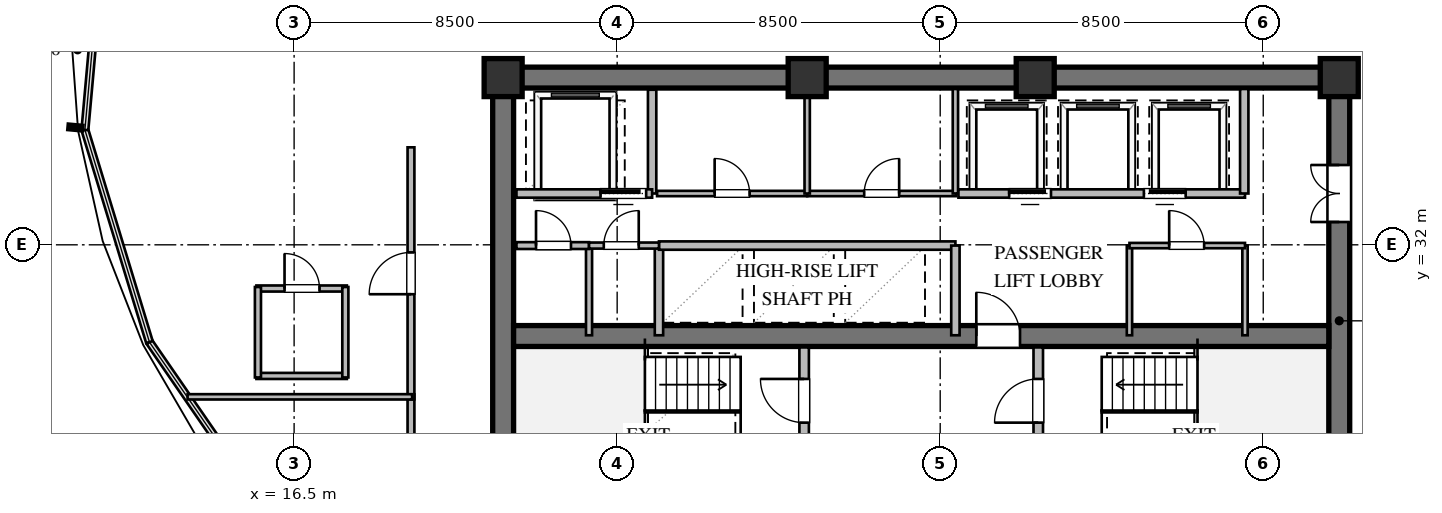
"""IFC4 building model, lengths in metres.
Left out: names, types, materials, properties, quantities, classifications, styles, units other than length and angle.
Written with IfcOpenShell. Run it as: python <this file> out.ifc"""

import sys

from ifc_helpers import new_model, si_unit, direction, frame, frame_2d, origin, origin_2d, place, context, subcontext, project, spatial, rectangle, extrude, element, fill, save


model = new_model("IFC4")
c1 = context("Model", 3, precision=1e-05, world=origin(), true_north=direction((0.0, 1.0)))
c2 = subcontext(c1, "Body", "Model", "MODEL_VIEW")
j1 = project(units=[si_unit("LENGTHUNIT", "METRE"), si_unit("PLANEANGLEUNIT", "RADIAN")], contexts=[c1])
p1 = place(None, origin())
s1 = spatial("IfcSite", under=j1, at=p1, CompositionType="ELEMENT")
p2 = place(p1, origin())
s2 = spatial("IfcBuilding", under=s1, at=p2, CompositionType="ELEMENT")
p3 = place(p2, frame((0.0, 0.0, 145.8)))
s3 = spatial("IfcBuildingStorey", under=s2, at=p3, CompositionType="ELEMENT", Elevation=145.8)
p4 = place(p3, frame((21.725, 36.4, 0.0), z_axis=(0.0, 0.0, 1.0), x_axis=(1.0, 0.0, 0.0)))
e1 = element("IfcWall", 1, at=p4, inside=s3, PredefinedType="SHEAR", context=c2, shape_type="SweptSolid", body=[
    extrude(rectangle(XDim=22.55, YDim=0.55, at=frame_2d((11.275, 0.0))), origin(), (0.0, 0.0, 1.0), 3.36),
])
p5 = place(p3, frame((22.0, 23.875, 0.0), z_axis=(0.0, 0.0, 1.0), x_axis=(0.0, 1.0, 0.0)))
e2 = element("IfcWall", 2, at=p5, inside=s3, PredefinedType="SHEAR", context=c2, shape_type="SweptSolid", body=[
    extrude(rectangle(XDim=12.25, YDim=0.55, at=frame_2d((6.125, 0.0))), origin(), (0.0, 0.0, 1.0), 3.36),
])
p6 = place(p3, frame((44.0, 23.875, 0.0), z_axis=(0.0, 0.0, 1.0), x_axis=(0.0, 1.0, 0.0)))
e3 = element("IfcWall", 3, at=p6, inside=s3, PredefinedType="SHEAR", context=c2, shape_type="SweptSolid", body=[
    extrude(rectangle(XDim=12.25, YDim=0.55, at=frame_2d((6.125, 0.0))), origin(), (0.0, 0.0, 1.0), 3.36),
])
p7 = place(p6, frame((8.725, 0.0, 0.0)))
e4 = element("IfcOpeningElement", 4, at=p7, cuts=e3, PredefinedType="OPENING", context=c2, shape_type="SweptSolid", body=[
    extrude(rectangle(XDim=1.5, YDim=2.15, at=frame_2d((0.75, 1.075))), frame((0.0, 0.285, 0.0), z_axis=(0.0, -1.0, 0.0), x_axis=(1.0, 0.0, 0.0)), (0.0, 0.0, 1.0), 0.57),
])
p8 = place(p3, frame((22.275, 29.6, 0.0), z_axis=(0.0, 0.0, 1.0), x_axis=(1.0, 0.0, 0.0)))
e5 = element("IfcWall", 5, at=p8, inside=s3, PredefinedType="SHEAR", context=c2, shape_type="SweptSolid", body=[
    extrude(rectangle(XDim=21.45, YDim=0.55, at=frame_2d((10.725, 0.0))), origin(), (0.0, 0.0, 1.0), 3.36),
])
p9 = place(p8, frame((12.175, 0.0, 0.0)))
e6 = element("IfcOpeningElement", 6, at=p9, cuts=e5, PredefinedType="OPENING", context=c2, shape_type="SweptSolid", body=[
    extrude(rectangle(XDim=1.15, YDim=2.1, at=frame_2d((0.575, 1.05))), frame((0.0, 0.285, 0.0), z_axis=(0.0, -1.0, 0.0), x_axis=(1.0, 0.0, 0.0)), (0.0, 0.0, 1.0), 0.57),
])
for number, where, z_axis, x_axis in (
    (7, (44.0, 36.4, 0.0), (0.0, 0.0, 1.0), (1.0, 0.0, 0.0)),
    (8, (36.0, 36.4, 0.0), (0.0, 0.0, 1.0), (1.0, 0.0, 0.0)),
    (9, (30.0, 36.4, 0.0), (0.0, 0.0, 1.0), (1.0, 0.0, 0.0)),
    (10, (22.0, 36.4, 0.0), (0.0, 0.0, 1.0), (1.0, 0.0, 0.0)),
):
    element("IfcColumn", number, at=place(p3, frame(where, z_axis=z_axis, x_axis=x_axis)), inside=s3, PredefinedType="COLUMN", context=c2, shape_type="SweptSolid", body=[
        extrude(rectangle(XDim=1.0, YDim=1.0, at=origin_2d()), origin(), (0.0, 0.0, 1.0), 3.6),
    ])
p10 = place(p3, frame((29.92, 23.9, 0.0), z_axis=(0.0, 0.0, 1.0), x_axis=(0.0, 1.0, 0.0)))
e11 = element("IfcWall", 11, at=p10, inside=s3, PredefinedType="SOLIDWALL", context=c2, shape_type="SweptSolid", body=[
    extrude(rectangle(XDim=5.4, YDim=0.25, at=frame_2d((2.7, 0.0))), origin(), (0.0, 0.0, 1.0), 2.806),
])
p11 = place(p10, frame((3.421, 0.0, 0.0)))
e12 = element("IfcOpeningElement", 12, at=p11, cuts=e11, PredefinedType="OPENING", context=c2, shape_type="SweptSolid", body=[
    extrude(rectangle(XDim=1.15, YDim=2.1, at=frame_2d((0.575, 1.05))), frame((0.0, 0.135, 0.0), z_axis=(0.0, -1.0, 0.0), x_axis=(1.0, 0.0, 0.0)), (0.0, 0.0, 1.0), 0.27),
])
p12 = place(p3, frame((36.08, 23.9, 0.0), z_axis=(0.0, 0.0, 1.0), x_axis=(0.0, 1.0, 0.0)))
e13 = element("IfcWall", 13, at=p12, inside=s3, PredefinedType="SOLIDWALL", context=c2, shape_type="SweptSolid", body=[
    extrude(rectangle(XDim=5.4, YDim=0.25, at=frame_2d((2.7, 0.0))), origin(), (0.0, 0.0, 1.0), 3.36),
])
p13 = place(p12, frame((3.421, 0.0, 0.0)))
e14 = element("IfcOpeningElement", 14, at=p13, cuts=e13, PredefinedType="OPENING", context=c2, shape_type="SweptSolid", body=[
    extrude(rectangle(XDim=1.15, YDim=2.1, at=frame_2d((0.575, 1.05))), frame((0.0, 0.135, 0.0), z_axis=(0.0, -1.0, 0.0), x_axis=(1.0, 0.0, 0.0)), (0.0, 0.0, 1.0), 0.27),
])
p14 = place(p3, frame((25.92, 33.35, 0.0), z_axis=(0.0, 0.0, 1.0), x_axis=(0.0, 1.0, 0.0)))
e15 = element("IfcWall", 15, at=p14, inside=s3, PredefinedType="SOLIDWALL", context=c2, shape_type="SweptSolid", body=[
    extrude(rectangle(XDim=2.73, YDim=0.22, at=frame_2d((1.365, 0.0))), origin(), (0.0, 0.0, 1.0), 3.36),
])
p15 = place(p3, frame((22.35, 33.35, 0.0), z_axis=(0.0, 0.0, 1.0), x_axis=(1.0, 0.0, 0.0)))
e16 = element("IfcWall", 16, at=p15, inside=s3, PredefinedType="SOLIDWALL", context=c2, shape_type="SweptSolid", body=[
    extrude(rectangle(XDim=3.57, YDim=0.22, at=frame_2d((1.785, 0.0))), origin(), (0.0, 0.0, 1.0), 3.36),
])
p16 = place(p15, frame((2.213, 0.0, 0.0)))
e17 = element("IfcOpeningElement", 17, at=p16, cuts=e16, PredefinedType="OPENING", context=c2, shape_type="SweptSolid", body=[
    extrude(rectangle(XDim=1.2, YDim=2.1, at=frame_2d((0.6, 1.05))), frame((0.0, 0.12, 0.0), z_axis=(0.0, -1.0, 0.0), x_axis=(1.0, 0.0, 0.0)), (0.0, 0.0, 1.0), 0.24),
])
p17 = place(p3, frame((26.1, 29.62, 0.0), z_axis=(0.0, 0.0, 1.0), x_axis=(0.0, 1.0, 0.0)))
e18 = element("IfcWall", 18, at=p17, inside=s3, PredefinedType="SOLIDWALL", context=c2, shape_type="SweptSolid", body=[
    extrude(rectangle(XDim=2.36, YDim=0.22, at=frame_2d((1.18, 0.0))), origin(), (0.0, 0.0, 1.0), 3.36),
])
p18 = place(p3, frame((26.1, 31.98, 0.0), z_axis=(0.0, 0.0, 1.0), x_axis=(1.0, 0.0, 0.0)))
e19 = element("IfcWall", 19, at=p18, inside=s3, PredefinedType="SOLIDWALL", context=c2, shape_type="SweptSolid", body=[
    extrude(rectangle(XDim=7.8, YDim=0.22, at=frame_2d((3.9, 0.0))), origin(), (0.0, 0.0, 1.0), 3.36),
])
p19 = place(p3, frame((33.9, 29.62, 0.0), z_axis=(0.0, 0.0, 1.0), x_axis=(0.0, 1.0, 0.0)))
e20 = element("IfcWall", 20, at=p19, inside=s3, PredefinedType="SOLIDWALL", context=c2, shape_type="SweptSolid", body=[
    extrude(rectangle(XDim=2.36, YDim=0.22, at=frame_2d((1.18, 0.0))), origin(), (0.0, 0.0, 1.0), 3.36),
])
p20 = place(p3, frame((26.05, 33.35, 0.0), z_axis=(0.0, 0.0, 1.0), x_axis=(1.0, 0.0, 0.0)))
e21 = element("IfcWall", 21, at=p20, inside=s3, PredefinedType="PARTITIONING", context=c2, shape_type="SweptSolid", body=[
    extrude(rectangle(XDim=3.95, YDim=0.14, at=frame_2d((1.975, 0.0))), origin(), (0.0, 0.0, 1.0), 3.36),
])
p21 = place(p20, frame((1.515, 0.0, 0.0)))
e22 = element("IfcOpeningElement", 22, at=p21, cuts=e21, PredefinedType="OPENING", context=c2, shape_type="SweptSolid", body=[
    extrude(rectangle(XDim=0.92, YDim=2.1, at=frame_2d((0.46, 1.05))), frame((0.0, 0.08, 0.0), z_axis=(0.0, -1.0, 0.0), x_axis=(1.0, 0.0, 0.0)), (0.0, 0.0, 1.0), 0.16),
])
p22 = place(p3, frame((30.0, 33.35, 0.0), z_axis=(0.0, 0.0, 1.0), x_axis=(1.0, 0.0, 0.0)))
e23 = element("IfcWall", 23, at=p22, inside=s3, PredefinedType="PARTITIONING", context=c2, shape_type="SweptSolid", body=[
    extrude(rectangle(XDim=3.92, YDim=0.14, at=frame_2d((1.96, 0.0))), origin(), (0.0, 0.0, 1.0), 3.36),
])
p23 = place(p22, frame((1.5, 0.0, 0.0)))
e24 = element("IfcOpeningElement", 24, at=p23, cuts=e23, PredefinedType="OPENING", context=c2, shape_type="SweptSolid", body=[
    extrude(rectangle(XDim=0.92, YDim=2.1, at=frame_2d((0.46, 1.05))), frame((0.0, 0.08, 0.0), z_axis=(0.0, -1.0, 0.0), x_axis=(1.0, 0.0, 0.0)), (0.0, 0.0, 1.0), 0.16),
])
for number, where, z_axis, x_axis in (
    (25, (30.0, 33.35, 0.0), (0.0, 0.0, 1.0), (0.0, 1.0, 0.0)),
    (26, (33.9, 33.35, 0.0), (0.0, 0.0, 1.0), (0.0, 1.0, 0.0)),
):
    element("IfcWall", number, at=place(p3, frame(where, z_axis=z_axis, x_axis=x_axis)), inside=s3, PredefinedType="PARTITIONING", context=c2, shape_type="SweptSolid", body=[
        extrude(rectangle(XDim=2.75, YDim=0.14, at=frame_2d((1.375, 0.0))), origin(), (0.0, 0.0, 1.0), 3.36),
    ])
p24 = place(p3, frame((33.98, 33.35, 0.0), z_axis=(0.0, 0.0, 1.0), x_axis=(1.0, 0.0, 0.0)))
e27 = element("IfcWall", 27, at=p24, inside=s3, PredefinedType="SOLIDWALL", context=c2, shape_type="SweptSolid", body=[
    extrude(rectangle(XDim=7.54, YDim=0.22, at=frame_2d((3.77, 0.0))), origin(), (0.0, 0.0, 1.0), 3.36),
])
p25 = place(p24, frame((1.335, 0.0, 0.0)))
e28 = element("IfcOpeningElement", 28, at=p25, cuts=e27, PredefinedType="OPENING", context=c2, shape_type="SweptSolid", body=[
    extrude(rectangle(XDim=1.1, YDim=2.1, at=frame_2d((0.55, 1.05))), frame((0.0, 0.12, 0.0), z_axis=(0.0, -1.0, 0.0), x_axis=(1.0, 0.0, 0.0)), (0.0, 0.0, 1.0), 0.24),
])
p26 = place(p24, frame((4.879, 0.0, 0.0)))
e29 = element("IfcOpeningElement", 29, at=p26, cuts=e27, PredefinedType="OPENING", context=c2, shape_type="SweptSolid", body=[
    extrude(rectangle(XDim=1.1, YDim=2.1, at=frame_2d((0.55, 1.05))), frame((0.0, 0.12, 0.0), z_axis=(0.0, -1.0, 0.0), x_axis=(1.0, 0.0, 0.0)), (0.0, 0.0, 1.0), 0.24),
])
p27 = place(p3, frame((41.5, 33.35, 0.0), z_axis=(0.0, 0.0, 1.0), x_axis=(0.0, 1.0, 0.0)))
e30 = element("IfcWall", 30, at=p27, inside=s3, PredefinedType="SOLIDWALL", context=c2, shape_type="SweptSolid", body=[
    extrude(rectangle(XDim=2.75, YDim=0.22, at=frame_2d((1.375, 0.0))), origin(), (0.0, 0.0, 1.0), 3.36),
])
p28 = place(p3, frame((24.26, 29.62, 0.0), z_axis=(0.0, 0.0, 1.0), x_axis=(0.0, 1.0, 0.0)))
e31 = element("IfcWall", 31, at=p28, inside=s3, PredefinedType="PLUMBINGWALL", context=c2, shape_type="SweptSolid", body=[
    extrude(rectangle(XDim=2.36, YDim=0.16, at=frame_2d((1.18, 0.0))), origin(), (0.0, 0.0, 1.0), 3.36),
])
p29 = place(p3, frame((22.35, 31.98, 0.0), z_axis=(0.0, 0.0, 1.0), x_axis=(1.0, 0.0, 0.0)))
e32 = element("IfcWall", 32, at=p29, inside=s3, PredefinedType="PARTITIONING", context=c2, shape_type="SweptSolid", body=[
    extrude(rectangle(XDim=1.91, YDim=0.18, at=frame_2d((0.955, 0.0))), origin(), (0.0, 0.0, 1.0), 3.36),
])
p30 = place(p29, frame((0.515, 0.0, 0.0)))
e33 = element("IfcOpeningElement", 33, at=p30, cuts=e32, PredefinedType="OPENING", context=c2, shape_type="SweptSolid", body=[
    extrude(rectangle(XDim=0.92, YDim=2.1, at=frame_2d((0.46, 1.05))), frame((0.0, 0.1, 0.0), z_axis=(0.0, -1.0, 0.0), x_axis=(1.0, 0.0, 0.0)), (0.0, 0.0, 1.0), 0.2),
])
p31 = place(p3, frame((24.26, 31.98, 0.0), z_axis=(0.0, 0.0, 1.0), x_axis=(1.0, 0.0, 0.0)))
e34 = element("IfcWall", 34, at=p31, inside=s3, PredefinedType="PLUMBINGWALL", context=c2, shape_type="SweptSolid", body=[
    extrude(rectangle(XDim=1.84, YDim=0.16, at=frame_2d((0.92, 0.0))), origin(), (0.0, 0.0, 1.0), 3.36),
])
p32 = place(p31, frame((0.388, 0.0, 0.0)))
e35 = element("IfcOpeningElement", 35, at=p32, cuts=e34, PredefinedType="OPENING", context=c2, shape_type="SweptSolid", body=[
    extrude(rectangle(XDim=0.92, YDim=2.1, at=frame_2d((0.46, 1.05))), frame((0.0, 0.09, 0.0), z_axis=(0.0, -1.0, 0.0), x_axis=(1.0, 0.0, 0.0)), (0.0, 0.0, 1.0), 0.18),
])
for number, where, z_axis, x_axis in (
    (36, (38.48, 29.62, 0.0), (0.0, 0.0, 1.0), (0.0, 1.0, 0.0)),
    (37, (41.52, 29.62, 0.0), (0.0, 0.0, 1.0), (0.0, 1.0, 0.0)),
):
    element("IfcWall", number, at=place(p3, frame(where, z_axis=z_axis, x_axis=x_axis)), inside=s3, PredefinedType="PARTITIONING", context=c2, shape_type="SweptSolid", body=[
        extrude(rectangle(XDim=2.36, YDim=0.14, at=frame_2d((1.18, 0.0))), origin(), (0.0, 0.0, 1.0), 3.36),
    ])
p33 = place(p3, frame((38.48, 31.98, 0.0), z_axis=(0.0, 0.0, 1.0), x_axis=(1.0, 0.0, 0.0)))
e38 = element("IfcWall", 38, at=p33, inside=s3, PredefinedType="PARTITIONING", context=c2, shape_type="SweptSolid", body=[
    extrude(rectangle(XDim=3.04, YDim=0.14, at=frame_2d((1.52, 0.0))), origin(), (0.0, 0.0, 1.0), 3.36),
])
p34 = place(p33, frame((1.045, 0.0, 0.0)))
e39 = element("IfcOpeningElement", 39, at=p34, cuts=e38, PredefinedType="OPENING", context=c2, shape_type="SweptSolid", body=[
    extrude(rectangle(XDim=0.92, YDim=2.1, at=frame_2d((0.46, 1.05))), frame((0.0, 0.08, 0.0), z_axis=(0.0, -1.0, 0.0), x_axis=(1.0, 0.0, 0.0)), (0.0, 0.0, 1.0), 0.16),
])
p35 = place(p3, frame((15.508, 28.55, 0.0), z_axis=(0.0, 0.0, 1.0), x_axis=(1.0, 0.0, 0.0)))
e40 = element("IfcWall", 40, at=p35, inside=s3, PredefinedType="PLUMBINGWALL", context=c2, shape_type="SweptSolid", body=[
    extrude(rectangle(XDim=2.38, YDim=0.16, at=frame_2d((1.19, 0.0))), origin(), (0.0, 0.0, 1.0), 3.36),
])
p36 = place(p3, frame((15.508, 30.85, 0.0), z_axis=(0.0, 0.0, 1.0), x_axis=(1.0, 0.0, 0.0)))
e41 = element("IfcWall", 41, at=p36, inside=s3, PredefinedType="PLUMBINGWALL", context=c2, shape_type="SweptSolid", body=[
    extrude(rectangle(XDim=2.38, YDim=0.16, at=frame_2d((1.19, 0.0))), origin(), (0.0, 0.0, 1.0), 3.36),
])
p37 = place(p36, frame((0.74, 0.0, 0.0)))
e42 = element("IfcOpeningElement", 42, at=p37, cuts=e41, PredefinedType="OPENING", context=c2, shape_type="SweptSolid", body=[
    extrude(rectangle(XDim=0.92, YDim=2.1, at=frame_2d((0.46, 1.05))), frame((0.0, 0.09, 0.0), z_axis=(0.0, -1.0, 0.0), x_axis=(1.0, 0.0, 0.0)), (0.0, 0.0, 1.0), 0.18),
])
for number, where, z_axis, x_axis in (
    (43, (15.548, 28.51, 0.0), (0.0, 0.0, 1.0), (0.0, 1.0, 0.0)),
    (44, (17.848, 28.51, 0.0), (0.0, 0.0, 1.0), (0.0, 1.0, 0.0)),
):
    element("IfcWall", number, at=place(p3, frame(where, z_axis=z_axis, x_axis=x_axis)), inside=s3, PredefinedType="PLUMBINGWALL", context=c2, shape_type="SweptSolid", body=[
        extrude(rectangle(XDim=2.38, YDim=0.16, at=frame_2d((1.19, 0.0))), origin(), (0.0, 0.0, 1.0), 3.36),
    ])
p38 = place(p3, frame((19.575, 21.775, 0.0), z_axis=(0.0, 0.0, 1.0), x_axis=(0.0, 1.0, 0.0)))
e45 = element("IfcWall", 45, at=p38, inside=s3, PredefinedType="PARTITIONING", context=c2, shape_type="SweptSolid", body=[
    extrude(rectangle(XDim=6.29, YDim=0.18, at=frame_2d((3.145, 0.0))), origin(), (0.0, 0.0, 1.0), 3.36),
])
p39 = place(p38, frame((2.338, 0.0, 0.0)))
e46 = element("IfcOpeningElement", 46, at=p39, cuts=e45, PredefinedType="OPENING", context=c2, shape_type="SweptSolid", body=[
    extrude(rectangle(XDim=1.1, YDim=2.1, at=frame_2d((0.55, 1.05))), frame((0.0, 0.1, 0.0), z_axis=(0.0, -1.0, 0.0), x_axis=(1.0, 0.0, 0.0)), (0.0, 0.0, 1.0), 0.2),
])
p40 = place(p3, frame((19.575, 27.935, 0.0), z_axis=(0.0, 0.0, 1.0), x_axis=(0.0, 1.0, 0.0)))
e47 = element("IfcWall", 47, at=p40, inside=s3, PredefinedType="PARTITIONING", context=c2, shape_type="SweptSolid", body=[
    extrude(rectangle(XDim=6.63, YDim=0.18, at=frame_2d((3.315, 0.0))), origin(), (0.0, 0.0, 1.0), 2.657),
])
p41 = place(p40, frame((2.765, 0.0, 0.0)))
e48 = element("IfcOpeningElement", 48, at=p41, cuts=e47, PredefinedType="OPENING", context=c2, shape_type="SweptSolid", body=[
    extrude(rectangle(XDim=1.1, YDim=2.1, at=frame_2d((0.55, 1.05))), frame((0.0, 0.1, 0.0), z_axis=(0.0, -1.0, 0.0), x_axis=(1.0, 0.0, 0.0)), (0.0, 0.0, 1.0), 0.2),
])
p42 = place(p3, frame((13.696, 28.0, 0.0), z_axis=(0.0, 0.0, 1.0), x_axis=(1.0, 0.0, 0.0)))
e49 = element("IfcWall", 49, at=p42, inside=s3, PredefinedType="PARTITIONING", context=c2, shape_type="SweptSolid", body=[
    extrude(rectangle(XDim=5.909, YDim=0.14, at=frame_2d((2.954, 0.0))), origin(), (0.0, 0.0, 1.0), 3.36),
])
p43 = place(p11, origin())
e50 = element("IfcDoor", 50, at=p43, inside=s3, OperationType="SINGLE_SWING_RIGHT", PredefinedType="DOOR", context=c2, shape_type="SweptSolid", body=[
    extrude(rectangle(XDim=1.15, YDim=2.1, at=frame_2d((0.575, 1.05))), frame((0.0, 0.025, 0.0), z_axis=(0.0, -1.0, 0.0), x_axis=(1.0, 0.0, 0.0)), (0.0, 0.0, 1.0), 0.05),
])
fill(e12, e50)
p44 = place(p13, origin())
e51 = element("IfcDoor", 51, at=p44, inside=s3, OperationType="SINGLE_SWING_LEFT", PredefinedType="DOOR", context=c2, shape_type="SweptSolid", body=[
    extrude(rectangle(XDim=1.15, YDim=2.1, at=frame_2d((0.575, 1.05))), frame((0.0, 0.025, 0.0), z_axis=(0.0, -1.0, 0.0), x_axis=(1.0, 0.0, 0.0)), (0.0, 0.0, 1.0), 0.05),
])
fill(e14, e51)
p45 = place(p9, origin())
e52 = element("IfcDoor", 52, at=p45, inside=s3, OperationType="SINGLE_SWING_LEFT", PredefinedType="DOOR", context=c2, shape_type="SweptSolid", body=[
    extrude(rectangle(XDim=1.15, YDim=2.1, at=frame_2d((0.575, 1.05))), frame((0.0, 0.025, 0.0), z_axis=(0.0, -1.0, 0.0), x_axis=(1.0, 0.0, 0.0)), (0.0, 0.0, 1.0), 0.05),
])
fill(e6, e52)
p46 = place(p7, origin())
e53 = element("IfcDoor", 53, at=p46, inside=s3, OperationType="DOUBLE_DOOR_SINGLE_SWING", PredefinedType="DOOR", context=c2, shape_type="SweptSolid", body=[
    extrude(rectangle(XDim=1.5, YDim=2.15, at=frame_2d((0.75, 1.075))), frame((0.0, 0.025, 0.0), z_axis=(0.0, -1.0, 0.0), x_axis=(1.0, 0.0, 0.0)), (0.0, 0.0, 1.0), 0.05),
])
fill(e4, e53)
p47 = place(p16, origin())
e54 = element("IfcDoor", 54, at=p47, inside=s3, OperationType="SLIDING_TO_LEFT", PredefinedType="DOOR", context=c2, shape_type="SweptSolid", body=[
    extrude(rectangle(XDim=1.2, YDim=2.1, at=frame_2d((0.6, 1.05))), frame((0.0, 0.025, 0.0), z_axis=(0.0, -1.0, 0.0), x_axis=(1.0, 0.0, 0.0)), (0.0, 0.0, 1.0), 0.05),
])
fill(e17, e54)
p48 = place(p21, origin())
e55 = element("IfcDoor", 55, at=p48, inside=s3, OperationType="SINGLE_SWING_LEFT", PredefinedType="DOOR", context=c2, shape_type="SweptSolid", body=[
    extrude(rectangle(XDim=0.92, YDim=2.1, at=frame_2d((0.46, 1.05))), frame((0.0, 0.025, 0.0), z_axis=(0.0, -1.0, 0.0), x_axis=(1.0, 0.0, 0.0)), (0.0, 0.0, 1.0), 0.05),
])
fill(e22, e55)
p49 = place(p23, origin())
e56 = element("IfcDoor", 56, at=p49, inside=s3, OperationType="SINGLE_SWING_RIGHT", PredefinedType="DOOR", context=c2, shape_type="SweptSolid", body=[
    extrude(rectangle(XDim=0.92, YDim=2.1, at=frame_2d((0.46, 1.05))), frame((0.0, 0.025, 0.0), z_axis=(0.0, -1.0, 0.0), x_axis=(1.0, 0.0, 0.0)), (0.0, 0.0, 1.0), 0.05),
])
fill(e24, e56)
p50 = place(p25, origin())
e57 = element("IfcDoor", 57, at=p50, inside=s3, OperationType="SLIDING_TO_LEFT", PredefinedType="DOOR", context=c2, shape_type="SweptSolid", body=[
    extrude(rectangle(XDim=1.1, YDim=2.1, at=frame_2d((0.55, 1.05))), frame((0.0, 0.025, 0.0), z_axis=(0.0, -1.0, 0.0), x_axis=(1.0, 0.0, 0.0)), (0.0, 0.0, 1.0), 0.05),
])
fill(e28, e57)
p51 = place(p26, origin())
e58 = element("IfcDoor", 58, at=p51, inside=s3, OperationType="SLIDING_TO_RIGHT", PredefinedType="DOOR", context=c2, shape_type="SweptSolid", body=[
    extrude(rectangle(XDim=1.1, YDim=2.1, at=frame_2d((0.55, 1.05))), frame((0.0, 0.025, 0.0), z_axis=(0.0, -1.0, 0.0), x_axis=(1.0, 0.0, 0.0)), (0.0, 0.0, 1.0), 0.05),
])
fill(e29, e58)
p52 = place(p30, origin())
e59 = element("IfcDoor", 59, at=p52, inside=s3, OperationType="SINGLE_SWING_LEFT", PredefinedType="DOOR", context=c2, shape_type="SweptSolid", body=[
    extrude(rectangle(XDim=0.92, YDim=2.1, at=frame_2d((0.46, 1.05))), frame((0.0, 0.025, 0.0), z_axis=(0.0, -1.0, 0.0), x_axis=(1.0, 0.0, 0.0)), (0.0, 0.0, 1.0), 0.05),
])
fill(e33, e59)
p53 = place(p32, origin())
e60 = element("IfcDoor", 60, at=p53, inside=s3, OperationType="SINGLE_SWING_RIGHT", PredefinedType="DOOR", context=c2, shape_type="SweptSolid", body=[
    extrude(rectangle(XDim=0.92, YDim=2.1, at=frame_2d((0.46, 1.05))), frame((0.0, 0.025, 0.0), z_axis=(0.0, -1.0, 0.0), x_axis=(1.0, 0.0, 0.0)), (0.0, 0.0, 1.0), 0.05),
])
fill(e35, e60)
p54 = place(p34, origin())
e61 = element("IfcDoor", 61, at=p54, inside=s3, OperationType="SINGLE_SWING_LEFT", PredefinedType="DOOR", context=c2, shape_type="SweptSolid", body=[
    extrude(rectangle(XDim=0.92, YDim=2.1, at=frame_2d((0.46, 1.05))), frame((0.0, 0.025, 0.0), z_axis=(0.0, -1.0, 0.0), x_axis=(1.0, 0.0, 0.0)), (0.0, 0.0, 1.0), 0.05),
])
fill(e39, e61)
p55 = place(p37, origin())
e62 = element("IfcDoor", 62, at=p55, inside=s3, OperationType="SINGLE_SWING_LEFT", PredefinedType="DOOR", context=c2, shape_type="SweptSolid", body=[
    extrude(rectangle(XDim=0.92, YDim=2.1, at=frame_2d((0.46, 1.05))), frame((0.0, 0.025, 0.0), z_axis=(0.0, -1.0, 0.0), x_axis=(1.0, 0.0, 0.0)), (0.0, 0.0, 1.0), 0.05),
])
fill(e42, e62)
p56 = place(p41, origin())
e63 = element("IfcDoor", 63, at=p56, inside=s3, OperationType="SINGLE_SWING_LEFT", PredefinedType="DOOR", context=c2, shape_type="SweptSolid", body=[
    extrude(rectangle(XDim=1.1, YDim=2.1, at=frame_2d((0.55, 1.05))), frame((0.0, 0.025, 0.0), z_axis=(0.0, -1.0, 0.0), x_axis=(1.0, 0.0, 0.0)), (0.0, 0.0, 1.0), 0.05),
])
fill(e48, e63)
save(model, sys.argv[1])
